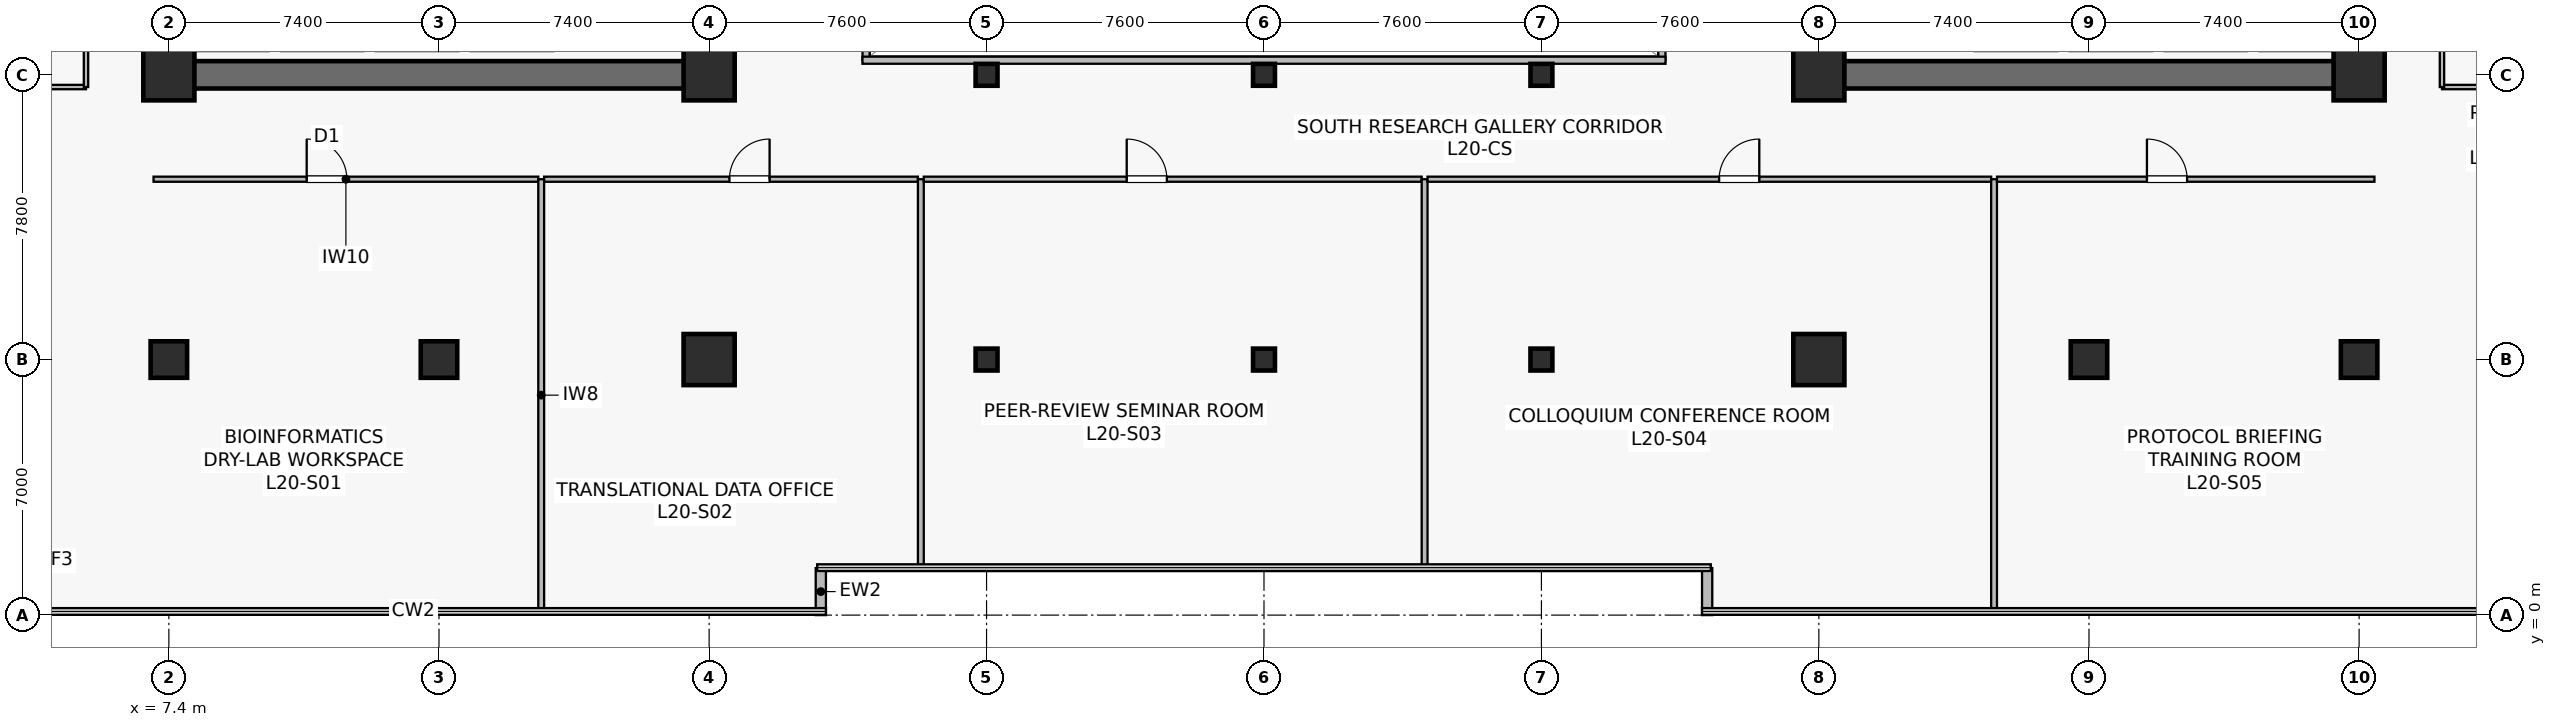
"""IFC4 building model, lengths in metres.
Left out: names, types, materials, properties, quantities, classifications, styles, units other than length and angle.
Written with IfcOpenShell. Run it as: python <this file> out.ifc"""

import sys

from ifc_helpers import new_model, si_unit, direction, frame, frame_2d, origin, origin_2d, place, context, subcontext, project, spatial, rectangle, hollow_rectangle, extrude, source, transform, mapped, element, fill, save


model = new_model("IFC4")
c1 = context("Model", 3, precision=1e-05, world=origin(), true_north=direction((0.0, 1.0)))
c2 = subcontext(c1, "Body", "Model", "MODEL_VIEW")
j1 = project(units=[si_unit("LENGTHUNIT", "METRE"), si_unit("PLANEANGLEUNIT", "RADIAN")], contexts=[c1])
p1 = place(None, origin())
s1 = spatial("IfcSite", under=j1, at=p1, CompositionType="ELEMENT")
p2 = place(p1, origin())
s2 = spatial("IfcBuilding", under=s1, at=p2, CompositionType="ELEMENT")
p3 = place(p2, frame((0.0, 0.0, 82.6)))
s3 = spatial("IfcBuildingStorey", under=s2, at=p3, CompositionType="ELEMENT", Elevation=82.6)
p4 = place(p3, frame((7.025, 14.8, 0.0), z_axis=(0.0, 0.0, 1.0), x_axis=(1.0, 0.0, 0.0)))
e1 = element("IfcWall", 1, at=p4, inside=s3, PredefinedType="SHEAR", context=c2, shape_type="SweptSolid", body=[
    extrude(rectangle(XDim=15.55, YDim=0.75, at=frame_2d((7.775, 0.0))), origin(), (0.0, 0.0, 1.0), 3.78),
])
p5 = place(p3, frame((7.4, 15.175, 0.0), z_axis=(0.0, 0.0, 1.0), x_axis=(0.0, 1.0, 0.0)))
e2 = element("IfcWall", 2, at=p5, inside=s3, PredefinedType="SHEAR", context=c2, shape_type="SweptSolid", body=[
    extrude(rectangle(XDim=18.25, YDim=0.75, at=frame_2d((9.125, 0.0))), origin(), (0.0, 0.0, 1.0), 3.78),
])
p6 = place(p3, frame((22.2, 15.175, 0.0), z_axis=(0.0, 0.0, 1.0), x_axis=(0.0, 1.0, 0.0)))
e3 = element("IfcWall", 3, at=p6, inside=s3, PredefinedType="SHEAR", context=c2, shape_type="SweptSolid", body=[
    extrude(rectangle(XDim=18.25, YDim=0.75, at=frame_2d((9.125, 0.0))), origin(), (0.0, 0.0, 1.0), 3.78),
])
p7 = place(p6, frame((3.375, 0.0, 0.0)))
e4 = element("IfcOpeningElement", 4, at=p7, cuts=e3, PredefinedType="OPENING", context=c2, shape_type="SweptSolid", body=[
    extrude(rectangle(XDim=1.42, YDim=2.2, at=frame_2d((0.71, 1.1))), frame((0.0, 0.385, 0.0), z_axis=(0.0, -1.0, 0.0), x_axis=(1.0, 0.0, 0.0)), (0.0, 0.0, 1.0), 0.77),
])
p8 = place(p3, frame((52.225, 14.8, 0.0), z_axis=(0.0, 0.0, 1.0), x_axis=(1.0, 0.0, 0.0)))
e5 = element("IfcWall", 5, at=p8, inside=s3, PredefinedType="SHEAR", context=c2, shape_type="SweptSolid", body=[
    extrude(rectangle(XDim=15.55, YDim=0.75, at=frame_2d((7.775, 0.0))), origin(), (0.0, 0.0, 1.0), 3.78),
])
p9 = place(p3, frame((52.6, 15.175, 0.0), z_axis=(0.0, 0.0, 1.0), x_axis=(0.0, 1.0, 0.0)))
e6 = element("IfcWall", 6, at=p9, inside=s3, PredefinedType="SHEAR", context=c2, shape_type="SweptSolid", body=[
    extrude(rectangle(XDim=18.25, YDim=0.75, at=frame_2d((9.125, 0.0))), origin(), (0.0, 0.0, 1.0), 3.78),
])
p10 = place(p9, frame((3.375, 0.0, 0.0)))
e7 = element("IfcOpeningElement", 7, at=p10, cuts=e6, PredefinedType="OPENING", context=c2, shape_type="SweptSolid", body=[
    extrude(rectangle(XDim=1.42, YDim=2.2, at=frame_2d((0.71, 1.1))), frame((0.0, 0.385, 0.0), z_axis=(0.0, -1.0, 0.0), x_axis=(1.0, 0.0, 0.0)), (0.0, 0.0, 1.0), 0.77),
])
p11 = place(p3, frame((67.4, 15.175, 0.0), z_axis=(0.0, 0.0, 1.0), x_axis=(0.0, 1.0, 0.0)))
e8 = element("IfcWall", 8, at=p11, inside=s3, PredefinedType="SHEAR", context=c2, shape_type="SweptSolid", body=[
    extrude(rectangle(XDim=18.25, YDim=0.75, at=frame_2d((9.125, 0.0))), origin(), (0.0, 0.0, 1.0), 3.78),
])
m1 = source(origin(), c2, "Body", "SweptSolid", [
    extrude(rectangle(XDim=1.0, YDim=1.0, at=origin_2d()), origin(), (0.0, 0.0, 1.0), 4.1),
])
p12 = place(p3, frame((14.8, 7.0, 0.0), z_axis=(0.0, 0.0, 1.0), x_axis=(1.0, 0.0, 0.0)))
e9 = element("IfcColumn", 9, at=p12, inside=s3, PredefinedType="COLUMN", context=c2, shape_type="MappedRepresentation", body=[
    mapped(m1, transform((0.0, 0.0, 0.0), scale=1.0)),
])
m2 = source(origin(), c2, "Body", "SweptSolid", [
    extrude(rectangle(XDim=1.4, YDim=1.4, at=origin_2d()), origin(), (0.0, 0.0, 1.0), 4.1),
])
for number, where, z_axis, x_axis in (
    (10, (22.2, 7.0, 0.0), (0.0, 0.0, 1.0), (1.0, 0.0, 0.0)),
    (11, (7.4, 14.8, 0.0), (0.0, 0.0, 1.0), (1.0, 0.0, 0.0)),
    (12, (22.2, 14.8, 0.0), (0.0, 0.0, 1.0), (1.0, 0.0, 0.0)),
    (13, (52.6, 7.0, 0.0), (0.0, 0.0, 1.0), (1.0, 0.0, 0.0)),
):
    element("IfcColumn", number, at=place(p3, frame(where, z_axis=z_axis, x_axis=x_axis)), inside=s3, PredefinedType="COLUMN", context=c2, shape_type="MappedRepresentation", body=[
        mapped(m2, transform((0.0, 0.0, 0.0), scale=1.0)),
    ])
p13 = place(p3, frame((60.0, 7.0, 0.0), z_axis=(0.0, 0.0, 1.0), x_axis=(1.0, 0.0, 0.0)))
e14 = element("IfcColumn", 14, at=p13, inside=s3, PredefinedType="COLUMN", context=c2, shape_type="MappedRepresentation", body=[
    mapped(m1, transform((0.0, 0.0, 0.0), scale=1.0)),
])
for number, where, z_axis, x_axis in (
    (15, (52.6, 14.8, 0.0), (0.0, 0.0, 1.0), (1.0, 0.0, 0.0)),
    (16, (67.4, 14.8, 0.0), (0.0, 0.0, 1.0), (1.0, 0.0, 0.0)),
):
    element("IfcColumn", number, at=place(p3, frame(where, z_axis=z_axis, x_axis=x_axis)), inside=s3, PredefinedType="COLUMN", context=c2, shape_type="MappedRepresentation", body=[
        mapped(m2, transform((0.0, 0.0, 0.0), scale=1.0)),
    ])
for number, where, z_axis, x_axis in (
    (17, (7.4, 7.0, 0.0), (0.0, 0.0, 1.0), (1.0, 0.0, 0.0)),
    (18, (67.4, 7.0, 0.0), (0.0, 0.0, 1.0), (1.0, 0.0, 0.0)),
):
    element("IfcColumn", number, at=place(p3, frame(where, z_axis=z_axis, x_axis=x_axis)), inside=s3, PredefinedType="COLUMN", context=c2, shape_type="MappedRepresentation", body=[
        mapped(m1, transform((0.0, 0.0, 0.0), scale=1.0)),
    ])
m3 = source(origin(), c2, "Body", "SweptSolid", [
    extrude(hollow_rectangle(XDim=0.6, YDim=0.6, WallThickness=0.028, at=origin_2d()), origin(), (0.0, 0.0, 1.0), 4.1),
])
for number, where, z_axis, x_axis in (
    (19, (29.8, 7.0, 0.0), (0.0, 0.0, 1.0), (1.0, 0.0, 0.0)),
    (20, (29.8, 14.8, 0.0), (0.0, 0.0, 1.0), (1.0, 0.0, 0.0)),
    (21, (37.4, 7.0, 0.0), (0.0, 0.0, 1.0), (1.0, 0.0, 0.0)),
    (22, (37.4, 14.8, 0.0), (0.0, 0.0, 1.0), (1.0, 0.0, 0.0)),
    (23, (45.0, 7.0, 0.0), (0.0, 0.0, 1.0), (1.0, 0.0, 0.0)),
    (24, (45.0, 14.8, 0.0), (0.0, 0.0, 1.0), (1.0, 0.0, 0.0)),
):
    element("IfcColumn", number, at=place(p3, frame(where, z_axis=z_axis, x_axis=x_axis)), inside=s3, PredefinedType="COLUMN", context=c2, shape_type="MappedRepresentation", body=[
        mapped(m3, transform((0.0, 0.0, 0.0), scale=1.0)),
    ])
for number, where, z_axis, x_axis in (
    (25, (25.26, 0.0, 0.0), (0.0, 0.0, 1.0), (0.0, 1.0, 0.0)),
    (26, (49.54, 1.288, 0.0), (0.0, 0.0, 1.0), (0.0, -1.0, 0.0)),
):
    element("IfcWall", number, at=place(p3, frame(where, z_axis=z_axis, x_axis=x_axis)), inside=s3, PredefinedType="STANDARD", context=c2, shape_type="SweptSolid", body=[
        extrude(rectangle(XDim=1.288, YDim=0.28, at=frame_2d((0.644, 0.0))), origin(), (0.0, 0.0, 1.0), 3.78),
    ])
p14 = place(p3, frame((26.5, 15.2, 0.0), z_axis=(0.0, 0.0, 1.0), x_axis=(0.0, 1.0, 0.0)))
e27 = element("IfcWall", 27, at=p14, inside=s3, PredefinedType="SOLIDWALL", context=c2, shape_type="SweptSolid", body=[
    extrude(rectangle(XDim=18.2, YDim=0.195, at=frame_2d((9.1, 0.0))), origin(), (0.0, 0.0, 1.0), 3.78),
])
p15 = place(p14, frame((1.8, 0.0, 0.9)))
e28 = element("IfcOpeningElement", 28, at=p15, cuts=e27, PredefinedType="OPENING", context=c2, shape_type="SweptSolid", body=[
    extrude(rectangle(XDim=1.5, YDim=1.4, at=frame_2d((0.75, 0.7))), frame((0.0, 0.107, 0.0), z_axis=(0.0, -1.0, 0.0), x_axis=(1.0, 0.0, 0.0)), (0.0, 0.0, 1.0), 0.215),
])
p16 = place(p14, frame((13.2, 0.0, 0.9)))
e29 = element("IfcOpeningElement", 29, at=p16, cuts=e27, PredefinedType="OPENING", context=c2, shape_type="SweptSolid", body=[
    extrude(rectangle(XDim=1.5, YDim=1.4, at=frame_2d((0.75, 0.7))), frame((0.0, 0.107, 0.0), z_axis=(0.0, -1.0, 0.0), x_axis=(1.0, 0.0, 0.0)), (0.0, 0.0, 1.0), 0.215),
])
p17 = place(p3, frame((48.3, 15.2, 0.0), z_axis=(0.0, 0.0, 1.0), x_axis=(0.0, 1.0, 0.0)))
e30 = element("IfcWall", 30, at=p17, inside=s3, PredefinedType="SOLIDWALL", context=c2, shape_type="SweptSolid", body=[
    extrude(rectangle(XDim=18.2, YDim=0.195, at=frame_2d((9.1, 0.0))), origin(), (0.0, 0.0, 1.0), 3.78),
])
p18 = place(p17, frame((1.8, 0.0, 0.9)))
e31 = element("IfcOpeningElement", 31, at=p18, cuts=e30, PredefinedType="OPENING", context=c2, shape_type="SweptSolid", body=[
    extrude(rectangle(XDim=1.5, YDim=1.4, at=frame_2d((0.75, 0.7))), frame((0.0, 0.107, 0.0), z_axis=(0.0, -1.0, 0.0), x_axis=(1.0, 0.0, 0.0)), (0.0, 0.0, 1.0), 0.215),
])
p19 = place(p17, frame((13.2, 0.0, 0.9)))
e32 = element("IfcOpeningElement", 32, at=p19, cuts=e30, PredefinedType="OPENING", context=c2, shape_type="SweptSolid", body=[
    extrude(rectangle(XDim=1.5, YDim=1.4, at=frame_2d((0.75, 0.7))), frame((0.0, 0.107, 0.0), z_axis=(0.0, -1.0, 0.0), x_axis=(1.0, 0.0, 0.0)), (0.0, 0.0, 1.0), 0.215),
])
p20 = place(p3, frame((26.4, 15.2, 0.0), z_axis=(0.0, 0.0, 1.0), x_axis=(1.0, 0.0, 0.0)))
e33 = element("IfcWall", 33, at=p20, inside=s3, PredefinedType="SOLIDWALL", context=c2, shape_type="SweptSolid", body=[
    extrude(rectangle(XDim=22.0, YDim=0.195, at=frame_2d((11.0, 0.0))), origin(), (0.0, 0.0, 1.0), 3.78),
])
p21 = place(p3, frame((6.98, 11.94, 0.0), z_axis=(0.0, 0.0, 1.0), x_axis=(1.0, 0.0, 0.0)))
e34 = element("IfcWall", 34, at=p21, inside=s3, PredefinedType="PARTITIONING", context=c2, shape_type="SweptSolid", body=[
    extrude(rectangle(XDim=10.54, YDim=0.14, at=frame_2d((5.27, 0.0))), origin(), (0.0, 0.0, 1.0), 3.115),
])
p22 = place(p21, frame((4.196, 0.0, 0.0)))
e35 = element("IfcOpeningElement", 35, at=p22, cuts=e34, PredefinedType="OPENING", context=c2, shape_type="SweptSolid", body=[
    extrude(rectangle(XDim=1.1, YDim=2.18, at=frame_2d((0.55, 1.09))), frame((0.0, 0.08, 0.0), z_axis=(0.0, -1.0, 0.0), x_axis=(1.0, 0.0, 0.0)), (0.0, 0.0, 1.0), 0.16),
])
p23 = place(p3, frame((17.6, 0.11, 0.0), z_axis=(0.0, 0.0, 1.0), x_axis=(0.0, 1.0, 0.0)))
e36 = element("IfcWall", 36, at=p23, inside=s3, PredefinedType="PARTITIONING", context=c2, shape_type="SweptSolid", body=[
    extrude(rectangle(XDim=11.83, YDim=0.16, at=frame_2d((5.915, 0.0))), origin(), (0.0, 0.0, 1.0), 3.015),
])
p24 = place(p3, frame((17.68, 11.94, 0.0), z_axis=(0.0, 0.0, 1.0), x_axis=(1.0, 0.0, 0.0)))
e37 = element("IfcWall", 37, at=p24, inside=s3, PredefinedType="PARTITIONING", context=c2, shape_type="SweptSolid", body=[
    extrude(rectangle(XDim=10.24, YDim=0.14, at=frame_2d((5.12, 0.0))), origin(), (0.0, 0.0, 1.0), 3.115),
])
p25 = place(p24, frame((5.076, 0.0, 0.0)))
e38 = element("IfcOpeningElement", 38, at=p25, cuts=e37, PredefinedType="OPENING", context=c2, shape_type="SweptSolid", body=[
    extrude(rectangle(XDim=1.1, YDim=2.18, at=frame_2d((0.55, 1.09))), frame((0.0, 0.08, 0.0), z_axis=(0.0, -1.0, 0.0), x_axis=(1.0, 0.0, 0.0)), (0.0, 0.0, 1.0), 0.16),
])
p26 = place(p3, frame((28.0, 1.31, 0.0), z_axis=(0.0, 0.0, 1.0), x_axis=(0.0, 1.0, 0.0)))
e39 = element("IfcWall", 39, at=p26, inside=s3, PredefinedType="PARTITIONING", context=c2, shape_type="SweptSolid", body=[
    extrude(rectangle(XDim=10.63, YDim=0.16, at=frame_2d((5.315, 0.0))), origin(), (0.0, 0.0, 1.0), 3.015),
])
p27 = place(p3, frame((28.08, 11.94, 0.0), z_axis=(0.0, 0.0, 1.0), x_axis=(1.0, 0.0, 0.0)))
e40 = element("IfcWall", 40, at=p27, inside=s3, PredefinedType="PARTITIONING", context=c2, shape_type="SweptSolid", body=[
    extrude(rectangle(XDim=13.64, YDim=0.14, at=frame_2d((6.82, 0.0))), origin(), (0.0, 0.0, 1.0), 3.115),
])
p28 = place(p27, frame((5.56, 0.0, 0.0)))
e41 = element("IfcOpeningElement", 41, at=p28, cuts=e40, PredefinedType="OPENING", context=c2, shape_type="SweptSolid", body=[
    extrude(rectangle(XDim=1.1, YDim=2.18, at=frame_2d((0.55, 1.09))), frame((0.0, 0.08, 0.0), z_axis=(0.0, -1.0, 0.0), x_axis=(1.0, 0.0, 0.0)), (0.0, 0.0, 1.0), 0.16),
])
p29 = place(p3, frame((41.8, 1.31, 0.0), z_axis=(0.0, 0.0, 1.0), x_axis=(0.0, 1.0, 0.0)))
e42 = element("IfcWall", 42, at=p29, inside=s3, PredefinedType="PARTITIONING", context=c2, shape_type="SweptSolid", body=[
    extrude(rectangle(XDim=10.63, YDim=0.16, at=frame_2d((5.315, 0.0))), origin(), (0.0, 0.0, 1.0), 3.015),
])
p30 = place(p3, frame((41.88, 11.94, 0.0), z_axis=(0.0, 0.0, 1.0), x_axis=(1.0, 0.0, 0.0)))
e43 = element("IfcWall", 43, at=p30, inside=s3, PredefinedType="PARTITIONING", context=c2, shape_type="SweptSolid", body=[
    extrude(rectangle(XDim=15.44, YDim=0.14, at=frame_2d((7.72, 0.0))), origin(), (0.0, 0.0, 1.0), 3.115),
])
p31 = place(p30, frame((7.988, 0.0, 0.0)))
e44 = element("IfcOpeningElement", 44, at=p31, cuts=e43, PredefinedType="OPENING", context=c2, shape_type="SweptSolid", body=[
    extrude(rectangle(XDim=1.1, YDim=2.18, at=frame_2d((0.55, 1.09))), frame((0.0, 0.08, 0.0), z_axis=(0.0, -1.0, 0.0), x_axis=(1.0, 0.0, 0.0)), (0.0, 0.0, 1.0), 0.16),
])
p32 = place(p3, frame((57.4, 0.11, 0.0), z_axis=(0.0, 0.0, 1.0), x_axis=(0.0, 1.0, 0.0)))
e45 = element("IfcWall", 45, at=p32, inside=s3, PredefinedType="PARTITIONING", context=c2, shape_type="SweptSolid", body=[
    extrude(rectangle(XDim=11.83, YDim=0.16, at=frame_2d((5.915, 0.0))), origin(), (0.0, 0.0, 1.0), 3.015),
])
p33 = place(p3, frame((57.48, 11.94, 0.0), z_axis=(0.0, 0.0, 1.0), x_axis=(1.0, 0.0, 0.0)))
e46 = element("IfcWall", 46, at=p33, inside=s3, PredefinedType="PARTITIONING", context=c2, shape_type="SweptSolid", body=[
    extrude(rectangle(XDim=10.34, YDim=0.14, at=frame_2d((5.17, 0.0))), origin(), (0.0, 0.0, 1.0), 3.115),
])
p34 = place(p33, frame((4.108, 0.0, 0.0)))
e47 = element("IfcOpeningElement", 47, at=p34, cuts=e46, PredefinedType="OPENING", context=c2, shape_type="SweptSolid", body=[
    extrude(rectangle(XDim=1.1, YDim=2.18, at=frame_2d((0.55, 1.09))), frame((0.0, 0.08, 0.0), z_axis=(0.0, -1.0, 0.0), x_axis=(1.0, 0.0, 0.0)), (0.0, 0.0, 1.0), 0.16),
])
p35 = place(p3, frame((0.11, 14.465, 0.0), z_axis=(0.0, 0.0, 1.0), x_axis=(1.0, 0.0, 0.0)))
e48 = element("IfcWall", 48, at=p35, inside=s3, PredefinedType="PARTITIONING", context=c2, shape_type="SweptSolid", body=[
    extrude(rectangle(XDim=5.02, YDim=0.12, at=frame_2d((2.51, 0.0))), origin(), (0.0, 0.0, 1.0), 3.78),
])
p36 = place(p3, frame((5.13, 14.465, 0.0), z_axis=(0.0, 0.0, 1.0), x_axis=(0.0, 1.0, 0.0)))
e49 = element("IfcWall", 49, at=p36, inside=s3, PredefinedType="PARTITIONING", context=c2, shape_type="SweptSolid", body=[
    extrude(rectangle(XDim=9.275, YDim=0.12, at=frame_2d((4.637, 0.0))), origin(), (0.0, 0.0, 1.0), 3.78),
])
p37 = place(p36, frame((4.188, 0.0, 0.0)))
e50 = element("IfcOpeningElement", 50, at=p37, cuts=e49, PredefinedType="OPENING", context=c2, shape_type="SweptSolid", body=[
    extrude(rectangle(XDim=0.9, YDim=2.1, at=frame_2d((0.45, 1.05))), frame((0.0, 0.07, 0.0), z_axis=(0.0, -1.0, 0.0), x_axis=(1.0, 0.0, 0.0)), (0.0, 0.0, 1.0), 0.14),
])
p38 = place(p3, frame((69.67, 14.465, 0.0), z_axis=(0.0, 0.0, 1.0), x_axis=(1.0, 0.0, 0.0)))
e51 = element("IfcWall", 51, at=p38, inside=s3, PredefinedType="PARTITIONING", context=c2, shape_type="SweptSolid", body=[
    extrude(rectangle(XDim=5.02, YDim=0.12, at=frame_2d((2.51, 0.0))), origin(), (0.0, 0.0, 1.0), 3.78),
])
p39 = place(p3, frame((69.67, 14.465, 0.0), z_axis=(0.0, 0.0, 1.0), x_axis=(0.0, 1.0, 0.0)))
e52 = element("IfcWall", 52, at=p39, inside=s3, PredefinedType="PARTITIONING", context=c2, shape_type="SweptSolid", body=[
    extrude(rectangle(XDim=5.675, YDim=0.12, at=frame_2d((2.837, 0.0))), origin(), (0.0, 0.0, 1.0), 3.78),
])
p40 = place(p39, frame((2.387, 0.0, 0.0)))
e53 = element("IfcOpeningElement", 53, at=p40, cuts=e52, PredefinedType="OPENING", context=c2, shape_type="SweptSolid", body=[
    extrude(rectangle(XDim=0.9, YDim=2.1, at=frame_2d((0.45, 1.05))), frame((0.0, 0.07, 0.0), z_axis=(0.0, -1.0, 0.0), x_axis=(1.0, 0.0, 0.0)), (0.0, 0.0, 1.0), 0.14),
])
m4 = source(origin(), c2, "Body", "SweptSolid", [
    extrude(rectangle(XDim=1.1, YDim=2.18, at=frame_2d((0.55, 1.09))), frame((0.0, 0.025, 0.0), z_axis=(0.0, -1.0, 0.0), x_axis=(1.0, 0.0, 0.0)), (0.0, 0.0, 1.0), 0.05),
])
p41 = place(p22, origin())
e54 = element("IfcDoor", 54, at=p41, inside=s3, OperationType="SINGLE_SWING_LEFT", PredefinedType="DOOR", context=c2, shape_type="MappedRepresentation", body=[
    mapped(m4, transform((0.0, 0.0, 0.0), scale=1.0)),
])
fill(e35, e54)
p42 = place(p25, origin())
e55 = element("IfcDoor", 55, at=p42, inside=s3, OperationType="SINGLE_SWING_RIGHT", PredefinedType="DOOR", context=c2, shape_type="MappedRepresentation", body=[
    mapped(m4, transform((0.0, 0.0, 0.0), scale=1.0)),
])
fill(e38, e55)
p43 = place(p28, origin())
e56 = element("IfcDoor", 56, at=p43, inside=s3, OperationType="SINGLE_SWING_LEFT", PredefinedType="DOOR", context=c2, shape_type="MappedRepresentation", body=[
    mapped(m4, transform((0.0, 0.0, 0.0), scale=1.0)),
])
fill(e41, e56)
p44 = place(p31, origin())
e57 = element("IfcDoor", 57, at=p44, inside=s3, OperationType="SINGLE_SWING_RIGHT", PredefinedType="DOOR", context=c2, shape_type="MappedRepresentation", body=[
    mapped(m4, transform((0.0, 0.0, 0.0), scale=1.0)),
])
fill(e44, e57)
p45 = place(p34, origin())
e58 = element("IfcDoor", 58, at=p45, inside=s3, OperationType="SINGLE_SWING_LEFT", PredefinedType="DOOR", context=c2, shape_type="MappedRepresentation", body=[
    mapped(m4, transform((0.0, 0.0, 0.0), scale=1.0)),
])
fill(e47, e58)
save(model, sys.argv[1])
